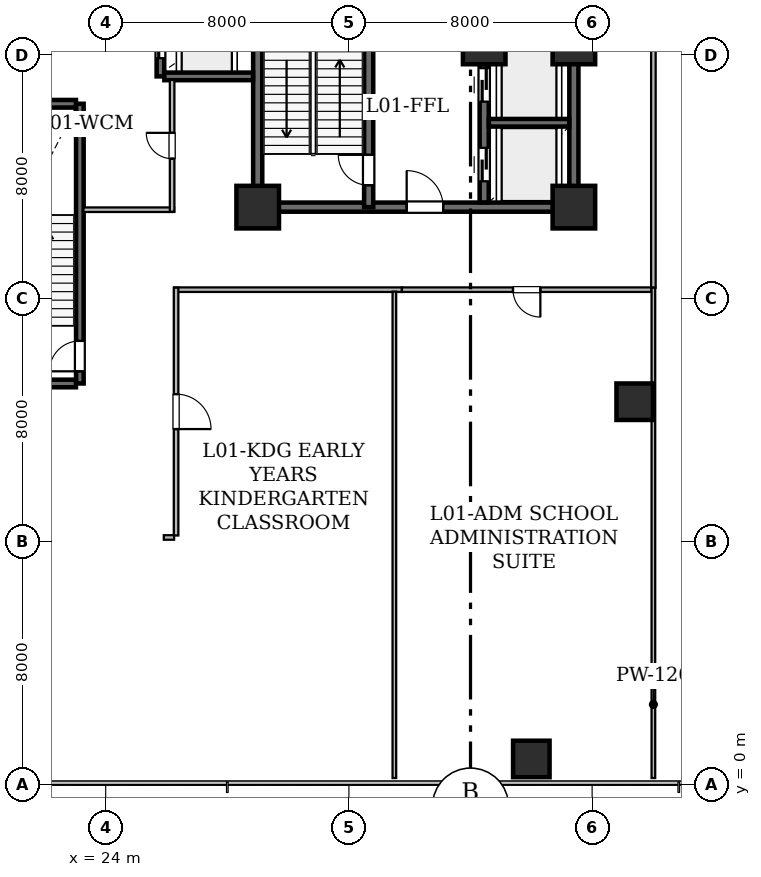
"""IFC4 building model, lengths in metres.
Left out: names, types, materials, properties, quantities, classifications, styles, units other than length and angle.
Written with IfcOpenShell. Run it as: python <this file> out.ifc"""

import sys

from ifc_helpers import new_model, si_unit, direction, frame, frame_2d, origin, origin_2d, place, context, subcontext, project, spatial, rectangle, hollow_rectangle, extrude, element, fill, save


model = new_model("IFC4")
c1 = context("Model", 3, precision=1e-05, world=origin(), true_north=direction((0.0, 1.0)))
c2 = subcontext(c1, "Body", "Model", "MODEL_VIEW")
j1 = project(units=[si_unit("LENGTHUNIT", "METRE"), si_unit("PLANEANGLEUNIT", "RADIAN")], contexts=[c1])
p1 = place(None, origin())
s1 = spatial("IfcSite", under=j1, at=p1, CompositionType="ELEMENT")
p2 = place(p1, origin())
s2 = spatial("IfcBuilding", under=s1, at=p2, CompositionType="ELEMENT")
p3 = place(p2, frame((0.0, 0.0, 7.2)))
s3 = spatial("IfcBuildingStorey", under=s2, at=p3, CompositionType="ELEMENT", Elevation=7.2)
for number, where, z_axis, x_axis in (
    (1, (29.0, 19.0, 0.0), (0.0, 0.0, 1.0), (1.0, 0.0, 0.0)),
    (2, (39.4, 19.0, 0.0), (0.0, 0.0, 1.0), (1.0, 0.0, 0.0)),
    (3, (36.45, 24.4, 0.0), (0.0, 0.0, 1.0), (1.0, 0.0, 0.0)),
    (4, (39.4, 24.4, 0.0), (0.0, 0.0, 1.0), (1.0, 0.0, 0.0)),
):
    element("IfcColumn", number, at=place(p3, frame(where, z_axis=z_axis, x_axis=x_axis)), inside=s3, PredefinedType="COLUMN", context=c2, shape_type="SweptSolid", body=[
        extrude(hollow_rectangle(XDim=1.4, YDim=1.4, WallThickness=0.07, at=origin_2d()), origin(), (0.0, 0.0, 1.0), 4.8),
    ])
for number, where, z_axis, x_axis in (
    (5, (38.0, 0.85, 0.0), (0.0, 0.0, 1.0), (1.0, 0.0, 0.0)),
    (6, (41.4, 12.6, 0.0), (0.0, 0.0, 1.0), (1.0, 0.0, 0.0)),
):
    element("IfcColumn", number, at=place(p3, frame(where, z_axis=z_axis, x_axis=x_axis)), inside=s3, PredefinedType="COLUMN", context=c2, shape_type="SweptSolid", body=[
        extrude(hollow_rectangle(XDim=1.2, YDim=1.2, WallThickness=0.06, at=origin_2d()), origin(), (0.0, 0.0, 1.0), 4.8),
    ])
p4 = place(p3, frame((29.0, 19.0, 0.0), z_axis=(0.0, 0.0, 1.0), x_axis=(0.0, 1.0, 0.0)))
e7 = element("IfcWall", 7, at=p4, inside=s3, PredefinedType="SHEAR", context=c2, shape_type="SweptSolid", body=[
    extrude(rectangle(XDim=9.0, YDim=0.3, at=frame_2d((4.5, 0.0))), origin(), (0.0, 0.0, 1.0), 4.48),
])
p5 = place(p3, frame((29.0, 19.0, 0.0), z_axis=(0.0, 0.0, 1.0), x_axis=(1.0, 0.0, 0.0)))
e8 = element("IfcWall", 8, at=p5, inside=s3, PredefinedType="SHEAR", context=c2, shape_type="SweptSolid", body=[
    extrude(rectangle(XDim=10.4, YDim=0.3, at=frame_2d((5.2, 0.0))), origin(), (0.0, 0.0, 1.0), 4.48),
])
p6 = place(p5, frame((4.9, 0.0, 0.0)))
e9 = element("IfcOpeningElement", 9, at=p6, cuts=e8, PredefinedType="OPENING", context=c2, shape_type="SweptSolid", body=[
    extrude(rectangle(XDim=1.2, YDim=2.15, at=frame_2d((0.6, 1.075))), frame((0.0, 0.16, 0.0), z_axis=(0.0, -1.0, 0.0), x_axis=(1.0, 0.0, 0.0)), (0.0, 0.0, 1.0), 0.32),
])
p7 = place(p3, frame((39.4, 19.0, 0.0), z_axis=(0.0, 0.0, 1.0), x_axis=(0.0, 1.0, 0.0)))
e10 = element("IfcWall", 10, at=p7, inside=s3, PredefinedType="SHEAR", context=c2, shape_type="SweptSolid", body=[
    extrude(rectangle(XDim=5.4, YDim=0.3, at=frame_2d((2.7, 0.0))), origin(), (0.0, 0.0, 1.0), 4.48),
])
p8 = place(p3, frame((32.65, 19.0, 0.0), z_axis=(0.0, 0.0, 1.0), x_axis=(0.0, 1.0, 0.0)))
e11 = element("IfcWall", 11, at=p8, inside=s3, PredefinedType="SHEAR", context=c2, shape_type="SweptSolid", body=[
    extrude(rectangle(XDim=9.0, YDim=0.3, at=frame_2d((4.5, 0.0))), origin(), (0.0, 0.0, 1.0), 4.48),
])
p9 = place(p8, frame((0.72, 0.0, 0.0)))
e12 = element("IfcOpeningElement", 12, at=p9, cuts=e11, PredefinedType="OPENING", context=c2, shape_type="SweptSolid", body=[
    extrude(rectangle(XDim=1.0, YDim=2.15, at=frame_2d((0.5, 1.075))), frame((0.0, 0.16, 0.0), z_axis=(0.0, -1.0, 0.0), x_axis=(1.0, 0.0, 0.0)), (0.0, 0.0, 1.0), 0.32),
])
p10 = place(p3, frame((36.45, 19.154, 0.0), z_axis=(0.0, 0.0, 1.0), x_axis=(0.0, 1.0, 0.0)))
e13 = element("IfcWall", 13, at=p10, inside=s3, PredefinedType="SHEAR", context=c2, shape_type="SweptSolid", body=[
    extrude(rectangle(XDim=4.546, YDim=0.3, at=frame_2d((2.273, 0.0))), origin(), (0.0, 0.0, 1.0), 4.48),
])
p11 = place(p10, frame((0.696, 0.0, 0.0)))
e14 = element("IfcOpeningElement", 14, at=p11, cuts=e13, PredefinedType="OPENING", context=c2, shape_type="SweptSolid", body=[
    extrude(rectangle(XDim=1.1, YDim=2.15, at=frame_2d((0.55, 1.075))), frame((0.0, 0.16, 0.0), z_axis=(0.0, -1.0, 0.0), x_axis=(1.0, 0.0, 0.0)), (0.0, 0.0, 1.0), 0.32),
])
p12 = place(p10, frame((3.316, 0.0, 0.0)))
e15 = element("IfcOpeningElement", 15, at=p12, cuts=e13, PredefinedType="OPENING", context=c2, shape_type="SweptSolid", body=[
    extrude(rectangle(XDim=1.1, YDim=2.15, at=frame_2d((0.55, 1.075))), frame((0.0, 0.16, 0.0), z_axis=(0.0, -1.0, 0.0), x_axis=(1.0, 0.0, 0.0)), (0.0, 0.0, 1.0), 0.32),
])
p13 = place(p3, frame((36.604, 21.775, 0.0), z_axis=(0.0, 0.0, 1.0), x_axis=(1.0, 0.0, 0.0)))
e16 = element("IfcWall", 16, at=p13, inside=s3, PredefinedType="SHEAR", context=c2, shape_type="SweptSolid", body=[
    extrude(rectangle(XDim=2.642, YDim=0.25, at=frame_2d((1.321, 0.0))), origin(), (0.0, 0.0, 1.0), 4.48),
])
p14 = place(p3, frame((23.15, 13.2, 0.0), z_axis=(0.0, 0.0, 1.0), x_axis=(0.0, 1.0, 0.0)))
e17 = element("IfcWall", 17, at=p14, inside=s3, PredefinedType="SHEAR", context=c2, shape_type="SweptSolid", body=[
    extrude(rectangle(XDim=9.2, YDim=0.25, at=frame_2d((4.6, 0.0))), origin(), (0.0, 0.0, 1.0), 4.48),
])
p15 = place(p14, frame((0.4, 0.0, 0.0)))
e18 = element("IfcOpeningElement", 18, at=p15, cuts=e17, PredefinedType="OPENING", context=c2, shape_type="SweptSolid", body=[
    extrude(rectangle(XDim=1.0, YDim=2.15, at=frame_2d((0.5, 1.075))), frame((0.0, 0.135, 0.0), z_axis=(0.0, -1.0, 0.0), x_axis=(1.0, 0.0, 0.0)), (0.0, 0.0, 1.0), 0.27),
])
for number, where, z_axis, x_axis in (
    (19, (19.329, 13.2, 0.0), (0.0, 0.0, 1.0), (1.0, 0.0, 0.0)),
    (20, (19.329, 22.4, 0.0), (0.0, 0.0, 1.0), (1.0, 0.0, 0.0)),
):
    element("IfcWall", number, at=place(p3, frame(where, z_axis=z_axis, x_axis=x_axis)), inside=s3, PredefinedType="SHEAR", context=c2, shape_type="SweptSolid", body=[
        extrude(rectangle(XDim=3.692, YDim=0.25, at=frame_2d((1.846, 0.0))), origin(), (0.0, 0.0, 1.0), 4.48),
    ])
p16 = place(p3, frame((25.8, 23.3, 0.0), z_axis=(0.0, 0.0, 1.0), x_axis=(0.0, 1.0, 0.0)))
e21 = element("IfcWall", 21, at=p16, inside=s3, PredefinedType="SHEAR", context=c2, shape_type="SweptSolid", body=[
    extrude(rectangle(XDim=4.55, YDim=0.25, at=frame_2d((2.275, 0.0))), origin(), (0.0, 0.0, 1.0), 4.48),
])
p17 = place(p16, frame((0.6, 0.0, 0.0)))
e22 = element("IfcOpeningElement", 22, at=p17, cuts=e21, PredefinedType="OPENING", context=c2, shape_type="SweptSolid", body=[
    extrude(rectangle(XDim=1.1, YDim=2.15, at=frame_2d((0.55, 1.075))), frame((0.0, 0.135, 0.0), z_axis=(0.0, -1.0, 0.0), x_axis=(1.0, 0.0, 0.0)), (0.0, 0.0, 1.0), 0.27),
])
p18 = place(p16, frame((2.85, 0.0, 0.0)))
e23 = element("IfcOpeningElement", 23, at=p18, cuts=e21, PredefinedType="OPENING", context=c2, shape_type="SweptSolid", body=[
    extrude(rectangle(XDim=1.1, YDim=2.15, at=frame_2d((0.55, 1.075))), frame((0.0, 0.135, 0.0), z_axis=(0.0, -1.0, 0.0), x_axis=(1.0, 0.0, 0.0)), (0.0, 0.0, 1.0), 0.27),
])
p19 = place(p3, frame((25.929, 23.3, 0.0), z_axis=(0.0, 0.0, 1.0), x_axis=(1.0, 0.0, 0.0)))
e24 = element("IfcWall", 24, at=p19, inside=s3, PredefinedType="SHEAR", context=c2, shape_type="SweptSolid", body=[
    extrude(rectangle(XDim=2.917, YDim=0.25, at=frame_2d((1.458, 0.0))), origin(), (0.0, 0.0, 1.0), 4.48),
])
p20 = place(p3, frame((23.267, 18.915, 0.0), z_axis=(0.0, 0.0, 1.0), x_axis=(1.0, 0.0, 0.0)))
e25 = element("IfcWall", 25, at=p20, inside=s3, PredefinedType="STANDARD", context=c2, shape_type="SweptSolid", body=[
    extrude(rectangle(XDim=2.983, YDim=0.15, at=frame_2d((1.491, 0.0))), origin(), (0.0, 0.0, 1.0), 4.48),
])
p21 = place(p3, frame((26.185, 18.852, 0.0), z_axis=(0.0, 0.0, 1.0), x_axis=(0.0, 1.0, 0.0)))
e26 = element("IfcWall", 26, at=p21, inside=s3, PredefinedType="STANDARD", context=c2, shape_type="SweptSolid", body=[
    extrude(rectangle(XDim=4.331, YDim=0.15, at=frame_2d((2.166, 0.0))), origin(), (0.0, 0.0, 1.0), 4.48),
])
p22 = place(p21, frame((1.741, 0.0, 0.0)))
e27 = element("IfcOpeningElement", 27, at=p22, cuts=e26, PredefinedType="OPENING", context=c2, shape_type="SweptSolid", body=[
    extrude(rectangle(XDim=0.85, YDim=2.1, at=frame_2d((0.425, 1.05))), frame((0.0, 0.085, 0.0), z_axis=(0.0, -1.0, 0.0), x_axis=(1.0, 0.0, 0.0)), (0.0, 0.0, 1.0), 0.17),
])
p23 = place(p3, frame((42.015, 37.814, 0.0), z_axis=(0.0, 0.0, 1.0), x_axis=(0.0, -1.0, 0.0)))
e28 = element("IfcWall", 28, at=p23, inside=s3, PredefinedType="STANDARD", context=c2, shape_type="SweptSolid", body=[
    extrude(rectangle(XDim=21.464, YDim=0.15, at=frame_2d((10.732, 0.0))), origin(), (0.0, 0.0, 1.0), 3.615),
])
p24 = place(p23, frame((10.178, 0.0, 0.0)))
e29 = element("IfcOpeningElement", 29, at=p24, cuts=e28, PredefinedType="OPENING", context=c2, shape_type="SweptSolid", body=[
    extrude(rectangle(XDim=1.15, YDim=2.2, at=frame_2d((0.575, 1.1))), frame((0.0, 0.085, 0.0), z_axis=(0.0, -1.0, 0.0), x_axis=(1.0, 0.0, 0.0)), (0.0, 0.0, 1.0), 0.17),
])
p25 = place(p3, frame((33.744, 16.285, 0.0), z_axis=(0.0, 0.0, 1.0), x_axis=(-1.0, 0.0, 0.0)))
e30 = element("IfcWall", 30, at=p25, inside=s3, PredefinedType="STANDARD", context=c2, shape_type="SweptSolid", body=[
    extrude(rectangle(XDim=7.494, YDim=0.15, at=frame_2d((3.747, 0.0))), origin(), (0.0, 0.0, 1.0), 4.48),
])
p26 = place(p3, frame((26.315, 16.35, 0.0), z_axis=(0.0, 0.0, 1.0), x_axis=(0.0, -1.0, 0.0)))
e31 = element("IfcWall", 31, at=p26, inside=s3, PredefinedType="STANDARD", context=c2, shape_type="SweptSolid", body=[
    extrude(rectangle(XDim=8.15, YDim=0.15, at=frame_2d((4.075, 0.0))), origin(), (0.0, 0.0, 1.0), 3.615),
])
p27 = place(p26, frame((3.5, 0.0, 0.0)))
e32 = element("IfcOpeningElement", 32, at=p27, cuts=e31, PredefinedType="OPENING", context=c2, shape_type="SweptSolid", body=[
    extrude(rectangle(XDim=1.15, YDim=2.2, at=frame_2d((0.575, 1.1))), frame((0.0, 0.085, 0.0), z_axis=(0.0, -1.0, 0.0), x_axis=(1.0, 0.0, 0.0)), (0.0, 0.0, 1.0), 0.17),
])
p28 = place(p3, frame((26.25, 8.135, 0.0), z_axis=(0.0, 0.0, 1.0), x_axis=(-1.0, 0.0, 0.0)))
e33 = element("IfcWall", 33, at=p28, inside=s3, PredefinedType="STANDARD", context=c2, shape_type="SweptSolid", body=[
    extrude(rectangle(XDim=0.339, YDim=0.15, at=frame_2d((0.169, 0.0))), origin(), (0.0, 0.0, 1.0), 4.48),
])
p29 = place(p3, frame((41.95, 16.285, 0.0), z_axis=(0.0, 0.0, 1.0), x_axis=(-1.0, 0.0, 0.0)))
e34 = element("IfcWall", 34, at=p29, inside=s3, PredefinedType="STANDARD", context=c2, shape_type="SweptSolid", body=[
    extrude(rectangle(XDim=8.206, YDim=0.15, at=frame_2d((4.103, 0.0))), origin(), (0.0, 0.0, 1.0), 3.615),
])
p30 = place(p29, frame((3.653, 0.0, 0.0)))
e35 = element("IfcOpeningElement", 35, at=p30, cuts=e34, PredefinedType="OPENING", context=c2, shape_type="SweptSolid", body=[
    extrude(rectangle(XDim=0.9, YDim=2.1, at=frame_2d((0.45, 1.05))), frame((0.0, 0.085, 0.0), z_axis=(0.0, -1.0, 0.0), x_axis=(1.0, 0.0, 0.0)), (0.0, 0.0, 1.0), 0.17),
])
p31 = place(p3, frame((42.015, 0.222, 0.0), z_axis=(0.0, 0.0, 1.0), x_axis=(0.0, 1.0, 0.0)))
e36 = element("IfcWall", 36, at=p31, inside=s3, PredefinedType="PARTITIONING", context=c2, shape_type="SweptSolid", body=[
    extrude(rectangle(XDim=16.128, YDim=0.12, at=frame_2d((8.064, 0.0))), origin(), (0.0, 0.0, 1.0), 3.615),
])
p32 = place(p3, frame((33.495, 16.22, 0.0), z_axis=(0.0, 0.0, 1.0), x_axis=(0.0, -1.0, 0.0)))
e37 = element("IfcWall", 37, at=p32, inside=s3, PredefinedType="PARTITIONING", context=c2, shape_type="SweptSolid", body=[
    extrude(rectangle(XDim=15.998, YDim=0.12, at=frame_2d((7.999, 0.0))), origin(), (0.0, 0.0, 1.0), 3.615),
])
p33 = place(p9, origin())
e38 = element("IfcDoor", 38, at=p33, inside=s3, OperationType="SINGLE_SWING_RIGHT", PredefinedType="DOOR", context=c2, shape_type="SweptSolid", body=[
    extrude(rectangle(XDim=1.0, YDim=2.15, at=frame_2d((0.5, 1.075))), frame((0.0, 0.025, 0.0), z_axis=(0.0, -1.0, 0.0), x_axis=(1.0, 0.0, 0.0)), (0.0, 0.0, 1.0), 0.05),
])
fill(e12, e38)
p34 = place(p6, origin())
e39 = element("IfcDoor", 39, at=p34, inside=s3, OperationType="SINGLE_SWING_LEFT", PredefinedType="DOOR", context=c2, shape_type="SweptSolid", body=[
    extrude(rectangle(XDim=1.2, YDim=2.15, at=frame_2d((0.6, 1.075))), frame((0.0, 0.025, 0.0), z_axis=(0.0, -1.0, 0.0), x_axis=(1.0, 0.0, 0.0)), (0.0, 0.0, 1.0), 0.05),
])
fill(e9, e39)
p35 = place(p11, origin())
e40 = element("IfcDoor", 40, at=p35, inside=s3, OperationType="SLIDING_TO_LEFT", PredefinedType="DOOR", context=c2, shape_type="SweptSolid", body=[
    extrude(rectangle(XDim=1.1, YDim=2.15, at=frame_2d((0.55, 1.075))), frame((0.0, 0.025, 0.0), z_axis=(0.0, -1.0, 0.0), x_axis=(1.0, 0.0, 0.0)), (0.0, 0.0, 1.0), 0.05),
])
fill(e14, e40)
p36 = place(p12, origin())
e41 = element("IfcDoor", 41, at=p36, inside=s3, OperationType="SLIDING_TO_LEFT", PredefinedType="DOOR", context=c2, shape_type="SweptSolid", body=[
    extrude(rectangle(XDim=1.1, YDim=2.15, at=frame_2d((0.55, 1.075))), frame((0.0, 0.025, 0.0), z_axis=(0.0, -1.0, 0.0), x_axis=(1.0, 0.0, 0.0)), (0.0, 0.0, 1.0), 0.05),
])
fill(e15, e41)
p37 = place(p15, origin())
e42 = element("IfcDoor", 42, at=p37, inside=s3, OperationType="SINGLE_SWING_LEFT", PredefinedType="DOOR", context=c2, shape_type="SweptSolid", body=[
    extrude(rectangle(XDim=1.0, YDim=2.15, at=frame_2d((0.5, 1.075))), frame((0.0, 0.025, 0.0), z_axis=(0.0, -1.0, 0.0), x_axis=(1.0, 0.0, 0.0)), (0.0, 0.0, 1.0), 0.05),
])
fill(e18, e42)
p38 = place(p17, origin())
e43 = element("IfcDoor", 43, at=p38, inside=s3, OperationType="SLIDING_TO_LEFT", PredefinedType="DOOR", context=c2, shape_type="SweptSolid", body=[
    extrude(rectangle(XDim=1.1, YDim=2.15, at=frame_2d((0.55, 1.075))), frame((0.0, 0.025, 0.0), z_axis=(0.0, -1.0, 0.0), x_axis=(1.0, 0.0, 0.0)), (0.0, 0.0, 1.0), 0.05),
])
fill(e22, e43)
p39 = place(p22, origin())
e44 = element("IfcDoor", 44, at=p39, inside=s3, OperationType="SINGLE_SWING_RIGHT", PredefinedType="DOOR", context=c2, shape_type="SweptSolid", body=[
    extrude(rectangle(XDim=0.85, YDim=2.1, at=frame_2d((0.425, 1.05))), frame((0.0, 0.025, 0.0), z_axis=(0.0, -1.0, 0.0), x_axis=(1.0, 0.0, 0.0)), (0.0, 0.0, 1.0), 0.05),
])
fill(e27, e44)
p40 = place(p27, origin())
e45 = element("IfcDoor", 45, at=p40, inside=s3, OperationType="SINGLE_SWING_RIGHT", PredefinedType="DOOR", context=c2, shape_type="SweptSolid", body=[
    extrude(rectangle(XDim=1.15, YDim=2.2, at=frame_2d((0.575, 1.1))), frame((0.0, 0.025, 0.0), z_axis=(0.0, -1.0, 0.0), x_axis=(1.0, 0.0, 0.0)), (0.0, 0.0, 1.0), 0.05),
])
fill(e32, e45)
p41 = place(p30, origin())
e46 = element("IfcDoor", 46, at=p41, inside=s3, OperationType="SINGLE_SWING_LEFT", PredefinedType="DOOR", context=c2, shape_type="SweptSolid", body=[
    extrude(rectangle(XDim=0.9, YDim=2.1, at=frame_2d((0.45, 1.05))), frame((0.0, 0.025, 0.0), z_axis=(0.0, -1.0, 0.0), x_axis=(1.0, 0.0, 0.0)), (0.0, 0.0, 1.0), 0.05),
])
fill(e35, e46)
save(model, sys.argv[1])
